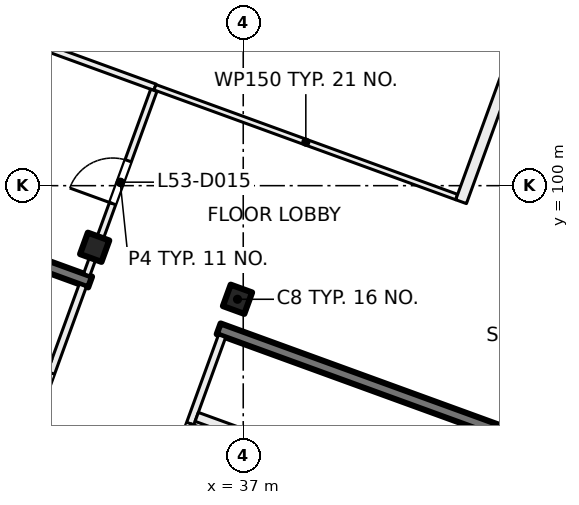
"""IFC4 building model, lengths in metres.
Left out: names, types, materials, properties, quantities, classifications, styles, units other than length and angle.
Written with IfcOpenShell. Run it as: python <this file> out.ifc"""

import sys

from ifc_helpers import new_model, si_unit, direction, frame, frame_2d, origin, origin_2d, place, context, subcontext, project, spatial, rectangle, extrude, element, fill, save


model = new_model("IFC4")
c1 = context("Model", 3, precision=1e-05, world=origin(), true_north=direction((0.0, 1.0)))
c2 = subcontext(c1, "Body", "Model", "MODEL_VIEW")
j1 = project(units=[si_unit("LENGTHUNIT", "METRE"), si_unit("PLANEANGLEUNIT", "RADIAN")], contexts=[c1])
p1 = place(None, origin())
s1 = spatial("IfcSite", under=j1, at=p1, CompositionType="ELEMENT")
p2 = place(p1, origin())
s2 = spatial("IfcBuilding", under=s1, at=p2, CompositionType="ELEMENT")
p3 = place(p2, frame((0.0, 0.0, 224.0)))
s3 = spatial("IfcBuildingStorey", under=s2, at=p3, CompositionType="ELEMENT", Elevation=224.0)
for number, where, z_axis, x_axis in (
    (1, (36.849, 97.011, 0.0), (0.0, 0.0, 1.0), (-0.342, -0.94, 0.0)),
    (2, (33.091, 98.379, 0.0), (0.0, 0.0, 1.0), (-0.342, -0.94, 0.0)),
):
    element("IfcColumn", number, at=place(p3, frame(where, z_axis=z_axis, x_axis=x_axis)), inside=s3, PredefinedType="COLUMN", context=c2, shape_type="SweptSolid", body=[
        extrude(rectangle(XDim=0.6, YDim=0.6, at=origin_2d()), origin(), (0.0, 0.0, 1.0), 4.0),
    ])
p4 = place(p3, frame((41.874, 85.232, 0.0), z_axis=(0.0, 0.0, 1.0), x_axis=(0.342020437038, 0.939692513883, 0.0)))
e3 = element("IfcWall", 3, at=p4, inside=s3, PredefinedType="SHEAR", context=c2, shape_type="SweptSolid", body=[
    extrude(rectangle(XDim=8.975, YDim=0.5, at=frame_2d((4.487, 0.0))), origin(), (0.0, 0.0, 1.0), 4.0),
])
p5 = place(p3, frame((44.529, 93.258, 0.0), z_axis=(0.0, 0.0, 1.0), x_axis=(-0.9396917844, 0.342022441267, 0.0)))
e4 = element("IfcWall", 4, at=p5, inside=s3, PredefinedType="SHEAR", context=c2, shape_type="SweptSolid", body=[
    extrude(rectangle(XDim=8.7, YDim=0.3, at=frame_2d((4.35, 0.0))), origin(), (0.0, 0.0, 1.0), 4.0),
])
p6 = place(p3, frame((32.971, 97.465, 0.0), z_axis=(0.0, 0.0, 1.0), x_axis=(-0.939695066972, 0.34201342241, 0.0)))
e5 = element("IfcWall", 5, at=p6, inside=s3, PredefinedType="SHEAR", context=c2, shape_type="SweptSolid", body=[
    extrude(rectangle(XDim=8.7, YDim=0.3, at=frame_2d((4.35, 0.0))), origin(), (0.0, 0.0, 1.0), 4.0),
])
p7 = place(p3, frame((24.666, 100.669, 0.0), z_axis=(0.0, 0.0, 1.0), x_axis=(0.34201964167, 0.939692803373, 0.0)))
e6 = element("IfcWall", 6, at=p7, inside=s3, PredefinedType="SOLIDWALL", context=c2, shape_type="SweptSolid", body=[
    extrude(rectangle(XDim=32.884, YDim=0.6, at=frame_2d((16.442, 0.0))), origin(), (0.0, 0.0, 1.0), 3.625),
])
p8 = place(p7, frame((1.48, 0.0, 0.9)))
e7 = element("IfcOpeningElement", 7, at=p8, cuts=e6, PredefinedType="OPENING", context=c2, shape_type="SweptSolid", body=[
    extrude(rectangle(XDim=3.0, YDim=2.4, at=frame_2d((1.5, 1.2))), frame((0.0, 0.31, 0.0), z_axis=(0.0, -1.0, 0.0), x_axis=(1.0, 0.0, 0.0)), (0.0, 0.0, 1.0), 0.62),
])
p9 = place(p7, frame((5.98, 0.0, 0.9)))
e8 = element("IfcOpeningElement", 8, at=p9, cuts=e6, PredefinedType="OPENING", context=c2, shape_type="SweptSolid", body=[
    extrude(rectangle(XDim=3.0, YDim=2.4, at=frame_2d((1.5, 1.2))), frame((0.0, 0.31, 0.0), z_axis=(0.0, -1.0, 0.0), x_axis=(1.0, 0.0, 0.0)), (0.0, 0.0, 1.0), 0.62),
])
p10 = place(p7, frame((10.48, 0.0, 0.9)))
e9 = element("IfcOpeningElement", 9, at=p10, cuts=e6, PredefinedType="OPENING", context=c2, shape_type="SweptSolid", body=[
    extrude(rectangle(XDim=3.0, YDim=2.4, at=frame_2d((1.5, 1.2))), frame((0.0, 0.31, 0.0), z_axis=(0.0, -1.0, 0.0), x_axis=(1.0, 0.0, 0.0)), (0.0, 0.0, 1.0), 0.62),
])
p11 = place(p7, frame((14.98, 0.0, 0.9)))
e10 = element("IfcOpeningElement", 10, at=p11, cuts=e6, PredefinedType="OPENING", context=c2, shape_type="SweptSolid", body=[
    extrude(rectangle(XDim=3.0, YDim=2.4, at=frame_2d((1.5, 1.2))), frame((0.0, 0.31, 0.0), z_axis=(0.0, -1.0, 0.0), x_axis=(1.0, 0.0, 0.0)), (0.0, 0.0, 1.0), 0.62),
])
p12 = place(p7, frame((19.48, 0.0, 0.9)))
e11 = element("IfcOpeningElement", 11, at=p12, cuts=e6, PredefinedType="OPENING", context=c2, shape_type="SweptSolid", body=[
    extrude(rectangle(XDim=3.0, YDim=2.4, at=frame_2d((1.5, 1.2))), frame((0.0, 0.31, 0.0), z_axis=(0.0, -1.0, 0.0), x_axis=(1.0, 0.0, 0.0)), (0.0, 0.0, 1.0), 0.62),
])
p13 = place(p7, frame((23.98, 0.0, 0.9)))
e12 = element("IfcOpeningElement", 12, at=p13, cuts=e6, PredefinedType="OPENING", context=c2, shape_type="SweptSolid", body=[
    extrude(rectangle(XDim=3.0, YDim=2.4, at=frame_2d((1.5, 1.2))), frame((0.0, 0.31, 0.0), z_axis=(0.0, -1.0, 0.0), x_axis=(1.0, 0.0, 0.0)), (0.0, 0.0, 1.0), 0.62),
])
p14 = place(p7, frame((28.48, 0.0, 0.9)))
e13 = element("IfcOpeningElement", 13, at=p14, cuts=e6, PredefinedType="OPENING", context=c2, shape_type="SweptSolid", body=[
    extrude(rectangle(XDim=3.0, YDim=2.4, at=frame_2d((1.5, 1.2))), frame((0.0, 0.31, 0.0), z_axis=(0.0, -1.0, 0.0), x_axis=(1.0, 0.0, 0.0)), (0.0, 0.0, 1.0), 0.62),
])
p15 = place(p3, frame((31.427, 93.663, 0.0), z_axis=(0.0, 0.0, 1.0), x_axis=(0.342030870568, 0.93968871632, 0.0)))
e14 = element("IfcWall", 14, at=p15, inside=s3, PredefinedType="PARTITIONING", context=c2, shape_type="SweptSolid", body=[
    extrude(rectangle(XDim=3.95, YDim=0.2, at=frame_2d((1.975, 0.0))), origin(), (0.0, 0.0, 1.0), 3.625),
])
p16 = place(p15, frame((0.3, 0.0, 0.0)))
e15 = element("IfcOpeningElement", 15, at=p16, cuts=e14, PredefinedType="OPENING", context=c2, shape_type="SweptSolid", body=[
    extrude(rectangle(XDim=1.2, YDim=2.1, at=frame_2d((0.6, 1.05))), frame((0.0, 0.11, 0.0), z_axis=(0.0, -1.0, 0.0), x_axis=(1.0, 0.0, 0.0)), (0.0, 0.0, 1.0), 0.22),
])
p17 = place(p3, frame((23.983, 98.208, 0.0), z_axis=(0.0, 0.0, 1.0), x_axis=(0.939699751196, -0.342000552051, 0.0)))
e16 = element("IfcWall", 16, at=p17, inside=s3, PredefinedType="PARTITIONING", context=c2, shape_type="SweptSolid", body=[
    extrude(rectangle(XDim=8.45, YDim=0.25, at=frame_2d((4.225, 0.0))), origin(), (0.0, 0.0, 1.0), 3.625),
])
p18 = place(p17, frame((6.665, 0.0, 0.0)))
e17 = element("IfcOpeningElement", 17, at=p18, cuts=e16, PredefinedType="OPENING", context=c2, shape_type="SweptSolid", body=[
    extrude(rectangle(XDim=0.8, YDim=2.1, at=frame_2d((0.4, 1.05))), frame((0.0, 0.135, 0.0), z_axis=(0.0, -1.0, 0.0), x_axis=(1.0, 0.0, 0.0)), (0.0, 0.0, 1.0), 0.27),
])
p19 = place(p17, frame((2.39, 0.0, 0.0)))
e18 = element("IfcOpeningElement", 18, at=p19, cuts=e16, PredefinedType="OPENING", context=c2, shape_type="SweptSolid", body=[
    extrude(rectangle(XDim=0.8, YDim=2.1, at=frame_2d((0.4, 1.05))), frame((0.0, 0.135, 0.0), z_axis=(0.0, -1.0, 0.0), x_axis=(1.0, 0.0, 0.0)), (0.0, 0.0, 1.0), 0.27),
])
p20 = place(p3, frame((36.443, 96.041, 0.0), z_axis=(0.0, 0.0, 1.0), x_axis=(-0.341996156931, -0.939701350773, 0.0)))
e19 = element("IfcWall", 19, at=p20, inside=s3, PredefinedType="PARTITIONING", context=c2, shape_type="SweptSolid", body=[
    extrude(rectangle(XDim=3.95, YDim=0.2, at=frame_2d((1.975, 0.0))), origin(), (0.0, 0.0, 1.0), 3.625),
])
p21 = place(p20, frame((2.45, 0.0, 0.0)))
e20 = element("IfcOpeningElement", 20, at=p21, cuts=e19, PredefinedType="OPENING", context=c2, shape_type="SweptSolid", body=[
    extrude(rectangle(XDim=1.2, YDim=2.1, at=frame_2d((0.6, 1.05))), frame((0.0, 0.11, 0.0), z_axis=(0.0, -1.0, 0.0), x_axis=(1.0, 0.0, 0.0)), (0.0, 0.0, 1.0), 0.22),
])
p22 = place(p3, frame((35.776, 93.916, 0.0), z_axis=(0.0, 0.0, 1.0), x_axis=(0.939690465531, -0.342026064782, 0.0)))
e21 = element("IfcWall", 21, at=p22, inside=s3, PredefinedType="PARTITIONING", context=c2, shape_type="SweptSolid", body=[
    extrude(rectangle(XDim=8.45, YDim=0.25, at=frame_2d((4.225, 0.0))), origin(), (0.0, 0.0, 1.0), 3.625),
])
p23 = place(p22, frame((3.825, 0.0, 0.0)))
e22 = element("IfcOpeningElement", 22, at=p23, cuts=e21, PredefinedType="OPENING", context=c2, shape_type="SweptSolid", body=[
    extrude(rectangle(XDim=0.8, YDim=2.1, at=frame_2d((0.4, 1.05))), frame((0.0, 0.135, 0.0), z_axis=(0.0, -1.0, 0.0), x_axis=(1.0, 0.0, 0.0)), (0.0, 0.0, 1.0), 0.27),
])
p24 = place(p3, frame((26.736, 105.48, 0.0), z_axis=(0.0, 0.0, 1.0), x_axis=(0.939706509432, -0.341981982173, 0.0)))
e23 = element("IfcWall", 23, at=p24, inside=s3, PredefinedType="PARTITIONING", context=c2, shape_type="SweptSolid", body=[
    extrude(rectangle(XDim=8.45, YDim=0.175, at=frame_2d((4.225, 0.0))), origin(), (0.0, 0.0, 1.0), 3.625),
])
p25 = place(p3, frame((32.881, 97.657, 0.0), z_axis=(0.0, 0.0, 1.0), x_axis=(0.342058204353, 0.939678766832, 0.0)))
e24 = element("IfcWall", 24, at=p25, inside=s3, PredefinedType="PARTITIONING", context=c2, shape_type="SweptSolid", body=[
    extrude(rectangle(XDim=5.163, YDim=0.175, at=frame_2d((2.581, 0.0))), origin(), (0.0, 0.0, 1.0), 3.625),
])
p26 = place(p25, frame((1.991, 0.0, 0.0)))
e25 = element("IfcOpeningElement", 25, at=p26, cuts=e24, PredefinedType="OPENING", context=c2, shape_type="SweptSolid", body=[
    extrude(rectangle(XDim=1.2, YDim=2.1, at=frame_2d((0.6, 1.05))), frame((0.0, 0.097, 0.0), z_axis=(0.0, -1.0, 0.0), x_axis=(1.0, 0.0, 0.0)), (0.0, 0.0, 1.0), 0.195),
])
p27 = place(p3, frame((34.677, 102.59, 0.0), z_axis=(0.0, 0.0, 1.0), x_axis=(0.939683705252, -0.342044637561, 0.0)))
e26 = element("IfcWall", 26, at=p27, inside=s3, PredefinedType="PARTITIONING", context=c2, shape_type="SweptSolid", body=[
    extrude(rectangle(XDim=8.45, YDim=0.15, at=frame_2d((4.225, 0.0))), origin(), (0.0, 0.0, 1.0), 3.625),
])
p28 = place(p3, frame((42.732, 99.579, 0.0), z_axis=(0.0, 0.0, 1.0), x_axis=(0.342036000593, 0.939686849061, 0.0)))
e27 = element("IfcWall", 27, at=p28, inside=s3, PredefinedType="PARTITIONING", context=c2, shape_type="SweptSolid", body=[
    extrude(rectangle(XDim=23.018, YDim=0.3, at=frame_2d((11.509, 0.0))), origin(), (0.0, 0.0, 1.0), 3.625),
])
p29 = place(p28, frame((15.225, 0.0, 0.0)))
e28 = element("IfcOpeningElement", 28, at=p29, cuts=e27, PredefinedType="OPENING", context=c2, shape_type="SweptSolid", body=[
    extrude(rectangle(XDim=1.2, YDim=2.1, at=frame_2d((0.6, 1.05))), frame((0.0, 0.16, 0.0), z_axis=(0.0, -1.0, 0.0), x_axis=(1.0, 0.0, 0.0)), (0.0, 0.0, 1.0), 0.32),
])
p30 = place(p28, frame((19.725, 0.0, 0.0)))
e29 = element("IfcOpeningElement", 29, at=p30, cuts=e27, PredefinedType="OPENING", context=c2, shape_type="SweptSolid", body=[
    extrude(rectangle(XDim=1.2, YDim=2.1, at=frame_2d((0.6, 1.05))), frame((0.0, 0.16, 0.0), z_axis=(0.0, -1.0, 0.0), x_axis=(1.0, 0.0, 0.0)), (0.0, 0.0, 1.0), 0.32),
])
p31 = place(p28, frame((5.925, 0.0, 0.0)))
e30 = element("IfcOpeningElement", 30, at=p31, cuts=e27, PredefinedType="OPENING", context=c2, shape_type="SweptSolid", body=[
    extrude(rectangle(XDim=1.8, YDim=2.1, at=frame_2d((0.9, 1.05))), frame((0.0, 0.16, 0.0), z_axis=(0.0, -1.0, 0.0), x_axis=(1.0, 0.0, 0.0)), (0.0, 0.0, 1.0), 0.32),
])
p32 = place(p16, origin())
e31 = element("IfcDoor", 31, at=p32, inside=s3, OperationType="DOUBLE_DOOR_SINGLE_SWING", PredefinedType="DOOR", context=c2, shape_type="SweptSolid", body=[
    extrude(rectangle(XDim=1.2, YDim=2.1, at=frame_2d((0.6, 1.05))), frame((0.0, 0.025, 0.0), z_axis=(0.0, -1.0, 0.0), x_axis=(1.0, 0.0, 0.0)), (0.0, 0.0, 1.0), 0.05),
])
fill(e15, e31)
p33 = place(p21, origin())
e32 = element("IfcDoor", 32, at=p33, inside=s3, OperationType="DOUBLE_DOOR_SINGLE_SWING", PredefinedType="DOOR", context=c2, shape_type="SweptSolid", body=[
    extrude(rectangle(XDim=1.2, YDim=2.1, at=frame_2d((0.6, 1.05))), frame((0.0, 0.025, 0.0), z_axis=(0.0, -1.0, 0.0), x_axis=(1.0, 0.0, 0.0)), (0.0, 0.0, 1.0), 0.05),
])
fill(e20, e32)
p34 = place(p26, origin())
e33 = element("IfcDoor", 33, at=p34, inside=s3, OperationType="DOUBLE_DOOR_SINGLE_SWING", PredefinedType="DOOR", context=c2, shape_type="SweptSolid", body=[
    extrude(rectangle(XDim=1.2, YDim=2.1, at=frame_2d((0.6, 1.05))), frame((0.0, 0.025, 0.0), z_axis=(0.0, -1.0, 0.0), x_axis=(1.0, 0.0, 0.0)), (0.0, 0.0, 1.0), 0.05),
])
fill(e25, e33)
save(model, sys.argv[1])
